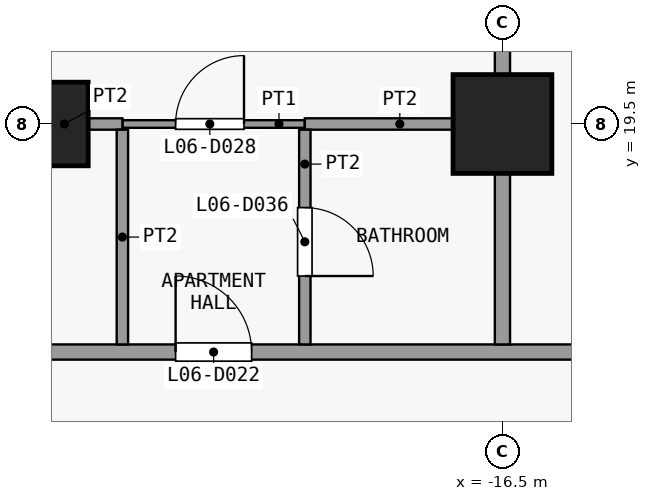
"""IFC4 building model, lengths in metres.
Left out: names, types, materials, properties, quantities, classifications, styles, units other than length and angle.
Written with IfcOpenShell. Run it as: python <this file> out.ifc"""

import sys

from ifc_helpers import new_model, si_unit, direction, frame, frame_2d, origin, origin_2d, place, context, subcontext, project, spatial, rectangle, extrude, element, fill, save


model = new_model("IFC4")
c1 = context("Model", 3, precision=1e-05, world=origin(), true_north=direction((0.0, 1.0)))
c2 = subcontext(c1, "Body", "Model", "MODEL_VIEW")
j1 = project(units=[si_unit("LENGTHUNIT", "METRE"), si_unit("PLANEANGLEUNIT", "RADIAN")], contexts=[c1])
p1 = place(None, origin())
s1 = spatial("IfcSite", under=j1, at=p1, CompositionType="ELEMENT")
p2 = place(p1, origin())
s2 = spatial("IfcBuilding", under=s1, at=p2, CompositionType="ELEMENT")
p3 = place(p2, frame((0.0, 0.0, 32.5)))
s3 = spatial("IfcBuildingStorey", under=s2, at=p3, CompositionType="ELEMENT", Elevation=32.5)
p4 = place(p3, frame((-22.5, 19.5, 0.0), z_axis=(0.0, 0.0, 1.0), x_axis=(1.0, 0.0, 0.0)))
e1 = element("IfcColumn", 1, at=p4, inside=s3, PredefinedType="COLUMN", context=c2, shape_type="SweptSolid", body=[
    extrude(rectangle(XDim=1.1, YDim=1.1, at=origin_2d()), origin(), (0.0, 0.0, 1.0), 3.6),
])
p5 = place(p3, frame((-16.5, 19.5, 0.0), z_axis=(0.0, 0.0, 1.0), x_axis=(1.0, 0.0, 0.0)))
e2 = element("IfcColumn", 2, at=p5, inside=s3, PredefinedType="COLUMN", context=c2, shape_type="SweptSolid", body=[
    extrude(rectangle(XDim=1.3, YDim=1.3, at=origin_2d()), origin(), (0.0, 0.0, 1.0), 3.6),
])
p6 = place(p3, frame((-25.35, 16.5, 0.0), z_axis=(0.0, 0.0, 1.0), x_axis=(1.0, 0.0, 0.0)))
e3 = element("IfcWall", 3, at=p6, inside=s3, PredefinedType="PARTITIONING", context=c2, shape_type="SweptSolid", body=[
    extrude(rectangle(XDim=51.6, YDim=0.2, at=frame_2d((25.8, 0.0))), origin(), (0.0, 0.0, 1.0), 3.3),
])
p7 = place(p6, frame((4.55, 0.0, 0.0)))
e4 = element("IfcOpeningElement", 4, at=p7, cuts=e3, PredefinedType="OPENING", context=c2, shape_type="SweptSolid", body=[
    extrude(rectangle(XDim=1.0, YDim=2.1, at=frame_2d((0.5, 1.05))), frame((0.0, 0.11, 0.0), z_axis=(0.0, -1.0, 0.0), x_axis=(1.0, 0.0, 0.0)), (0.0, 0.0, 1.0), 0.22),
])
p8 = place(p6, frame((11.35, 0.0, 0.0)))
e5 = element("IfcOpeningElement", 5, at=p8, cuts=e3, PredefinedType="OPENING", context=c2, shape_type="SweptSolid", body=[
    extrude(rectangle(XDim=0.9, YDim=2.1, at=frame_2d((0.45, 1.05))), frame((0.0, 0.11, 0.0), z_axis=(0.0, -1.0, 0.0), x_axis=(1.0, 0.0, 0.0)), (0.0, 0.0, 1.0), 0.22),
])
p9 = place(p6, frame((17.35, 0.0, 0.0)))
e6 = element("IfcOpeningElement", 6, at=p9, cuts=e3, PredefinedType="OPENING", context=c2, shape_type="SweptSolid", body=[
    extrude(rectangle(XDim=0.9, YDim=2.1, at=frame_2d((0.45, 1.05))), frame((0.0, 0.11, 0.0), z_axis=(0.0, -1.0, 0.0), x_axis=(1.0, 0.0, 0.0)), (0.0, 0.0, 1.0), 0.22),
])
p10 = place(p6, frame((24.05, 0.0, 0.0)))
e7 = element("IfcOpeningElement", 7, at=p10, cuts=e3, PredefinedType="OPENING", context=c2, shape_type="SweptSolid", body=[
    extrude(rectangle(XDim=1.0, YDim=2.1, at=frame_2d((0.5, 1.05))), frame((0.0, 0.11, 0.0), z_axis=(0.0, -1.0, 0.0), x_axis=(1.0, 0.0, 0.0)), (0.0, 0.0, 1.0), 0.22),
])
p11 = place(p6, frame((30.55, 0.0, 0.0)))
e8 = element("IfcOpeningElement", 8, at=p11, cuts=e3, PredefinedType="OPENING", context=c2, shape_type="SweptSolid", body=[
    extrude(rectangle(XDim=1.0, YDim=2.1, at=frame_2d((0.5, 1.05))), frame((0.0, 0.11, 0.0), z_axis=(0.0, -1.0, 0.0), x_axis=(1.0, 0.0, 0.0)), (0.0, 0.0, 1.0), 0.22),
])
p12 = place(p6, frame((42.55, 0.0, 0.0)))
e9 = element("IfcOpeningElement", 9, at=p12, cuts=e3, PredefinedType="OPENING", context=c2, shape_type="SweptSolid", body=[
    extrude(rectangle(XDim=1.0, YDim=2.1, at=frame_2d((0.5, 1.05))), frame((0.0, 0.11, 0.0), z_axis=(0.0, -1.0, 0.0), x_axis=(1.0, 0.0, 0.0)), (0.0, 0.0, 1.0), 0.22),
])
p13 = place(p3, frame((-21.5, 19.5, 0.0), z_axis=(0.0, 0.0, 1.0), x_axis=(1.0, 0.0, 0.0)))
e10 = element("IfcWall", 10, at=p13, inside=s3, PredefinedType="PARTITIONING", context=c2, shape_type="SweptSolid", body=[
    extrude(rectangle(XDim=2.4, YDim=0.1, at=frame_2d((1.2, 0.0))), origin(), (0.0, 0.0, 1.0), 3.3),
])
p14 = place(p13, frame((0.7, 0.0, 0.0)))
e11 = element("IfcOpeningElement", 11, at=p14, cuts=e10, PredefinedType="OPENING", context=c2, shape_type="SweptSolid", body=[
    extrude(rectangle(XDim=0.9, YDim=2.1, at=frame_2d((0.45, 1.05))), frame((0.0, 0.06, 0.0), z_axis=(0.0, -1.0, 0.0), x_axis=(1.0, 0.0, 0.0)), (0.0, 0.0, 1.0), 0.12),
])
p15 = place(p3, frame((-25.25, 19.5, 0.0), z_axis=(0.0, 0.0, 1.0), x_axis=(1.0, 0.0, 0.0)))
e12 = element("IfcWall", 12, at=p15, inside=s3, PredefinedType="PARTITIONING", context=c2, shape_type="SweptSolid", body=[
    extrude(rectangle(XDim=3.75, YDim=0.15, at=frame_2d((1.875, 0.0))), origin(), (0.0, 0.0, 1.0), 3.3),
])
p16 = place(p15, frame((1.2, 0.0, 0.0)))
e13 = element("IfcOpeningElement", 13, at=p16, cuts=e12, PredefinedType="OPENING", context=c2, shape_type="SweptSolid", body=[
    extrude(rectangle(XDim=0.9, YDim=2.1, at=frame_2d((0.45, 1.05))), frame((0.0, 0.085, 0.0), z_axis=(0.0, -1.0, 0.0), x_axis=(1.0, 0.0, 0.0)), (0.0, 0.0, 1.0), 0.17),
])
p17 = place(p3, frame((-19.1, 19.5, 0.0), z_axis=(0.0, 0.0, 1.0), x_axis=(1.0, 0.0, 0.0)))
e14 = element("IfcWall", 14, at=p17, inside=s3, PredefinedType="PARTITIONING", context=c2, shape_type="SweptSolid", body=[
    extrude(rectangle(XDim=2.5, YDim=0.15, at=frame_2d((1.25, 0.0))), origin(), (0.0, 0.0, 1.0), 3.3),
])
p18 = place(p3, frame((-21.5, 16.6, 0.0), z_axis=(0.0, 0.0, 1.0), x_axis=(0.0, 1.0, 0.0)))
e15 = element("IfcWall", 15, at=p18, inside=s3, PredefinedType="PARTITIONING", context=c2, shape_type="SweptSolid", body=[
    extrude(rectangle(XDim=2.825, YDim=0.15, at=frame_2d((1.413, 0.0))), origin(), (0.0, 0.0, 1.0), 3.3),
])
p19 = place(p3, frame((-19.1, 16.6, 0.0), z_axis=(0.0, 0.0, 1.0), x_axis=(0.0, 1.0, 0.0)))
e16 = element("IfcWall", 16, at=p19, inside=s3, PredefinedType="PARTITIONING", context=c2, shape_type="SweptSolid", body=[
    extrude(rectangle(XDim=2.825, YDim=0.15, at=frame_2d((1.413, 0.0))), origin(), (0.0, 0.0, 1.0), 3.3),
])
p20 = place(p19, frame((0.9, 0.0, 0.0)))
e17 = element("IfcOpeningElement", 17, at=p20, cuts=e16, PredefinedType="OPENING", context=c2, shape_type="SweptSolid", body=[
    extrude(rectangle(XDim=0.9, YDim=2.1, at=frame_2d((0.45, 1.05))), frame((0.0, 0.085, 0.0), z_axis=(0.0, -1.0, 0.0), x_axis=(1.0, 0.0, 0.0)), (0.0, 0.0, 1.0), 0.17),
])
p21 = place(p3, frame((-16.5, 16.6, 0.0), z_axis=(0.0, 0.0, 1.0), x_axis=(0.0, 1.0, 0.0)))
e18 = element("IfcWall", 18, at=p21, inside=s3, PredefinedType="PARTITIONING", context=c2, shape_type="SweptSolid", body=[
    extrude(rectangle(XDim=11.65, YDim=0.2, at=frame_2d((5.825, 0.0))), origin(), (0.0, 0.0, 1.0), 3.3),
])
p22 = place(p7, origin())
e19 = element("IfcDoor", 19, at=p22, inside=s3, OperationType="SINGLE_SWING_RIGHT", PredefinedType="DOOR", context=c2, shape_type="SweptSolid", body=[
    extrude(rectangle(XDim=1.0, YDim=2.1, at=frame_2d((0.5, 1.05))), frame((0.0, 0.025, 0.0), z_axis=(0.0, -1.0, 0.0), x_axis=(1.0, 0.0, 0.0)), (0.0, 0.0, 1.0), 0.05),
])
fill(e4, e19)
p23 = place(p14, origin())
e20 = element("IfcDoor", 20, at=p23, inside=s3, OperationType="SINGLE_SWING_LEFT", PredefinedType="DOOR", context=c2, shape_type="SweptSolid", body=[
    extrude(rectangle(XDim=0.9, YDim=2.1, at=frame_2d((0.45, 1.05))), frame((0.0, 0.025, 0.0), z_axis=(0.0, -1.0, 0.0), x_axis=(1.0, 0.0, 0.0)), (0.0, 0.0, 1.0), 0.05),
])
fill(e11, e20)
p24 = place(p20, origin())
e21 = element("IfcDoor", 21, at=p24, inside=s3, OperationType="SINGLE_SWING_LEFT", PredefinedType="DOOR", context=c2, shape_type="SweptSolid", body=[
    extrude(rectangle(XDim=0.9, YDim=2.1, at=frame_2d((0.45, 1.05))), frame((0.0, 0.025, 0.0), z_axis=(0.0, -1.0, 0.0), x_axis=(1.0, 0.0, 0.0)), (0.0, 0.0, 1.0), 0.05),
])
fill(e17, e21)
save(model, sys.argv[1])
